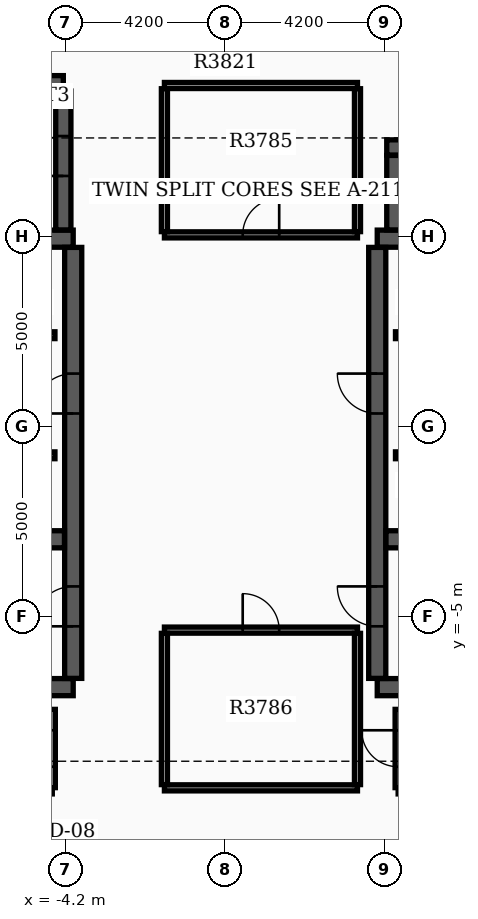
"""IFC4 building model, lengths in metres.
Left out: names, types, materials, properties, quantities, classifications, styles, units other than length and angle.
Written with IfcOpenShell. Run it as: python <this file> out.ifc"""

import sys

from ifc_helpers import new_model, si_unit, direction, frame, frame_2d, origin, place, context, subcontext, project, spatial, rectangle, extrude, element, fill, save


model = new_model("IFC4")
c1 = context("Model", 3, precision=1e-05, world=origin(), true_north=direction((0.0, 1.0)))
c2 = subcontext(c1, "Body", "Model", "MODEL_VIEW")
j1 = project(units=[si_unit("LENGTHUNIT", "METRE"), si_unit("PLANEANGLEUNIT", "RADIAN")], contexts=[c1])
p1 = place(None, origin())
s1 = spatial("IfcSite", under=j1, at=p1, CompositionType="ELEMENT")
p2 = place(p1, origin())
s2 = spatial("IfcBuilding", under=s1, at=p2, CompositionType="ELEMENT")
p3 = place(p2, frame((0.0, 0.0, 236.4)))
s3 = spatial("IfcBuildingStorey", under=s2, at=p3, CompositionType="ELEMENT", Elevation=236.4)
for number, where, z_axis, x_axis in (
    (1, (-12.4, -6.85, 0.0), (0.0, 0.0, 1.0), (1.0, 0.0, 0.0)),
    (2, (-12.4, 4.95, 0.0), (0.0, 0.0, 1.0), (1.0, 0.0, 0.0)),
):
    element("IfcWall", number, at=place(p3, frame(where, z_axis=z_axis, x_axis=x_axis)), inside=s3, PredefinedType="SHEAR", context=c2, shape_type="SweptSolid", body=[
        extrude(rectangle(XDim=8.4, YDim=0.45, at=frame_2d((4.2, 0.0))), origin(), (0.0, 0.0, 1.0), 3.65),
    ])
p4 = place(p3, frame((-4.0, -6.62, 0.0), z_axis=(0.0, 0.0, 1.0), x_axis=(0.0, 1.0, 0.0)))
e3 = element("IfcWall", 3, at=p4, inside=s3, PredefinedType="SHEAR", context=c2, shape_type="SweptSolid", body=[
    extrude(rectangle(XDim=11.34, YDim=0.45, at=frame_2d((5.67, 0.0))), origin(), (0.0, 0.0, 1.0), 3.65),
])
p5 = place(p4, frame((1.37, 0.0, 0.0)))
e4 = element("IfcOpeningElement", 4, at=p5, cuts=e3, PredefinedType="OPENING", context=c2, shape_type="SweptSolid", body=[
    extrude(rectangle(XDim=1.05, YDim=2.15, at=frame_2d((0.525, 1.075))), frame((0.0, 0.235, 0.0), z_axis=(0.0, -1.0, 0.0), x_axis=(1.0, 0.0, 0.0)), (0.0, 0.0, 1.0), 0.47),
])
p6 = place(p4, frame((6.97, 0.0, 0.0)))
e5 = element("IfcOpeningElement", 5, at=p6, cuts=e3, PredefinedType="OPENING", context=c2, shape_type="SweptSolid", body=[
    extrude(rectangle(XDim=1.05, YDim=2.15, at=frame_2d((0.525, 1.075))), frame((0.0, 0.235, 0.0), z_axis=(0.0, -1.0, 0.0), x_axis=(1.0, 0.0, 0.0)), (0.0, 0.0, 1.0), 0.47),
])
p7 = place(p3, frame((-12.17, -2.96, 0.0), z_axis=(0.0, 0.0, 1.0), x_axis=(1.0, 0.0, 0.0)))
e6 = element("IfcWall", 6, at=p7, inside=s3, PredefinedType="SHEAR", context=c2, shape_type="SweptSolid", body=[
    extrude(rectangle(XDim=7.94, YDim=0.45, at=frame_2d((3.97, 0.0))), origin(), (0.0, 0.0, 1.0), 3.65),
])
for number, where, z_axis, x_axis in (
    (7, (4.0, -6.85, 0.0), (0.0, 0.0, 1.0), (1.0, 0.0, 0.0)),
    (8, (4.0, 4.95, 0.0), (0.0, 0.0, 1.0), (1.0, 0.0, 0.0)),
):
    element("IfcWall", number, at=place(p3, frame(where, z_axis=z_axis, x_axis=x_axis)), inside=s3, PredefinedType="SHEAR", context=c2, shape_type="SweptSolid", body=[
        extrude(rectangle(XDim=8.4, YDim=0.45, at=frame_2d((4.2, 0.0))), origin(), (0.0, 0.0, 1.0), 3.65),
    ])
p8 = place(p3, frame((4.0, -6.62, 0.0), z_axis=(0.0, 0.0, 1.0), x_axis=(0.0, 1.0, 0.0)))
e9 = element("IfcWall", 9, at=p8, inside=s3, PredefinedType="SHEAR", context=c2, shape_type="SweptSolid", body=[
    extrude(rectangle(XDim=11.34, YDim=0.45, at=frame_2d((5.67, 0.0))), origin(), (0.0, 0.0, 1.0), 3.65),
])
p9 = place(p8, frame((1.37, 0.0, 0.0)))
e10 = element("IfcOpeningElement", 10, at=p9, cuts=e9, PredefinedType="OPENING", context=c2, shape_type="SweptSolid", body=[
    extrude(rectangle(XDim=1.05, YDim=2.15, at=frame_2d((0.525, 1.075))), frame((0.0, 0.235, 0.0), z_axis=(0.0, -1.0, 0.0), x_axis=(1.0, 0.0, 0.0)), (0.0, 0.0, 1.0), 0.47),
])
p10 = place(p8, frame((6.97, 0.0, 0.0)))
e11 = element("IfcOpeningElement", 11, at=p10, cuts=e9, PredefinedType="OPENING", context=c2, shape_type="SweptSolid", body=[
    extrude(rectangle(XDim=1.05, YDim=2.15, at=frame_2d((0.525, 1.075))), frame((0.0, 0.235, 0.0), z_axis=(0.0, -1.0, 0.0), x_axis=(1.0, 0.0, 0.0)), (0.0, 0.0, 1.0), 0.47),
])
p11 = place(p3, frame((4.23, -2.96, 0.0), z_axis=(0.0, 0.0, 1.0), x_axis=(1.0, 0.0, 0.0)))
e12 = element("IfcWall", 12, at=p11, inside=s3, PredefinedType="SHEAR", context=c2, shape_type="SweptSolid", body=[
    extrude(rectangle(XDim=7.94, YDim=0.45, at=frame_2d((3.97, 0.0))), origin(), (0.0, 0.0, 1.0), 3.65),
])
p12 = place(p3, frame((-12.22, 9.04, 0.0), z_axis=(0.0, 0.0, 1.0), x_axis=(1.0, 0.0, 0.0)))
e13 = element("IfcWall", 13, at=p12, inside=s3, PredefinedType="SHEAR", context=c2, shape_type="SweptSolid", body=[
    extrude(rectangle(XDim=7.96, YDim=0.4, at=frame_2d((3.98, 0.0))), origin(), (0.0, 0.0, 1.0), 3.65),
])
p13 = place(p3, frame((-4.26, 5.18, 0.0), z_axis=(0.0, 0.0, 1.0), x_axis=(0.0, 1.0, 0.0)))
e14 = element("IfcWall", 14, at=p13, inside=s3, PredefinedType="SHEAR", context=c2, shape_type="SweptSolid", body=[
    extrude(rectangle(XDim=3.655, YDim=0.4, at=frame_2d((1.828, 0.0))), origin(), (0.0, 0.0, 1.0), 3.65),
])
p14 = place(p13, frame((1.42, 0.0, 0.0)))
e15 = element("IfcOpeningElement", 15, at=p14, cuts=e14, PredefinedType="OPENING", context=c2, shape_type="SweptSolid", body=[
    extrude(rectangle(XDim=1.05, YDim=2.15, at=frame_2d((0.525, 1.075))), frame((0.0, 0.21, 0.0), z_axis=(0.0, -1.0, 0.0), x_axis=(1.0, 0.0, 0.0)), (0.0, 0.0, 1.0), 0.42),
])
p15 = place(p3, frame((4.45, 5.18, 0.0), z_axis=(0.0, 0.0, 1.0), x_axis=(0.0, 1.0, 0.0)))
e16 = element("IfcWall", 16, at=p15, inside=s3, PredefinedType="SHEAR", context=c2, shape_type="SweptSolid", body=[
    extrude(rectangle(XDim=1.96, YDim=0.4, at=frame_2d((0.98, 0.0))), origin(), (0.0, 0.0, 1.0), 3.65),
])
p16 = place(p3, frame((4.25, 7.35, 0.0), z_axis=(0.0, 0.0, 1.0), x_axis=(1.0, 0.0, 0.0)))
e17 = element("IfcWall", 17, at=p16, inside=s3, PredefinedType="SHEAR", context=c2, shape_type="SweptSolid", body=[
    extrude(rectangle(XDim=5.4, YDim=0.4, at=frame_2d((2.7, 0.0))), origin(), (0.0, 0.0, 1.0), 3.65),
])
p17 = place(p3, frame((-11.9, 2.41, 0.0), z_axis=(0.0, 0.0, 1.0), x_axis=(1.0, 0.0, 0.0)))
e18 = element("IfcWall", 18, at=p17, inside=s3, PredefinedType="SOLIDWALL", context=c2, shape_type="SweptSolid", body=[
    extrude(rectangle(XDim=7.42, YDim=0.18, at=frame_2d((3.71, 0.0))), origin(), (0.0, 0.0, 1.0), 3.12),
])
p18 = place(p17, frame((0.55, 0.0, 0.0)))
e19 = element("IfcOpeningElement", 19, at=p18, cuts=e18, PredefinedType="OPENING", context=c2, shape_type="SweptSolid", body=[
    extrude(rectangle(XDim=1.1, YDim=2.15, at=frame_2d((0.55, 1.075))), frame((0.0, 0.1, 0.0), z_axis=(0.0, -1.0, 0.0), x_axis=(1.0, 0.0, 0.0)), (0.0, 0.0, 1.0), 0.2),
])
p19 = place(p17, frame((4.9, 0.0, 0.0)))
e20 = element("IfcOpeningElement", 20, at=p19, cuts=e18, PredefinedType="OPENING", context=c2, shape_type="SweptSolid", body=[
    extrude(rectangle(XDim=0.88, YDim=2.1, at=frame_2d((0.44, 1.05))), frame((0.0, 0.1, 0.0), z_axis=(0.0, -1.0, 0.0), x_axis=(1.0, 0.0, 0.0)), (0.0, 0.0, 1.0), 0.2),
])
p20 = place(p3, frame((4.48, 2.41, 0.0), z_axis=(0.0, 0.0, 1.0), x_axis=(1.0, 0.0, 0.0)))
e21 = element("IfcWall", 21, at=p20, inside=s3, PredefinedType="SOLIDWALL", context=c2, shape_type="SweptSolid", body=[
    extrude(rectangle(XDim=7.42, YDim=0.18, at=frame_2d((3.71, 0.0))), origin(), (0.0, 0.0, 1.0), 3.12),
])
p21 = place(p20, frame((5.67, 0.0, 0.0)))
e22 = element("IfcOpeningElement", 22, at=p21, cuts=e21, PredefinedType="OPENING", context=c2, shape_type="SweptSolid", body=[
    extrude(rectangle(XDim=1.1, YDim=2.15, at=frame_2d((0.55, 1.075))), frame((0.0, 0.1, 0.0), z_axis=(0.0, -1.0, 0.0), x_axis=(1.0, 0.0, 0.0)), (0.0, 0.0, 1.0), 0.2),
])
p22 = place(p20, frame((1.6, 0.0, 0.0)))
e23 = element("IfcOpeningElement", 23, at=p22, cuts=e21, PredefinedType="OPENING", context=c2, shape_type="SweptSolid", body=[
    extrude(rectangle(XDim=0.88, YDim=2.1, at=frame_2d((0.44, 1.05))), frame((0.0, 0.1, 0.0), z_axis=(0.0, -1.0, 0.0), x_axis=(1.0, 0.0, 0.0)), (0.0, 0.0, 1.0), 0.2),
])
p23 = place(p3, frame((-11.9, -0.75, 0.0), z_axis=(0.0, 0.0, 1.0), x_axis=(1.0, 0.0, 0.0)))
e24 = element("IfcWall", 24, at=p23, inside=s3, PredefinedType="SOLIDWALL", context=c2, shape_type="SweptSolid", body=[
    extrude(rectangle(XDim=7.42, YDim=0.18, at=frame_2d((3.71, 0.0))), origin(), (0.0, 0.0, 1.0), 3.12),
])
p24 = place(p23, frame((5.75, 0.0, 0.0)))
e25 = element("IfcOpeningElement", 25, at=p24, cuts=e24, PredefinedType="OPENING", context=c2, shape_type="SweptSolid", body=[
    extrude(rectangle(XDim=1.1, YDim=2.15, at=frame_2d((0.55, 1.075))), frame((0.0, 0.1, 0.0), z_axis=(0.0, -1.0, 0.0), x_axis=(1.0, 0.0, 0.0)), (0.0, 0.0, 1.0), 0.2),
])
p25 = place(p23, frame((1.6, 0.0, 0.0)))
e26 = element("IfcOpeningElement", 26, at=p25, cuts=e24, PredefinedType="OPENING", context=c2, shape_type="SweptSolid", body=[
    extrude(rectangle(XDim=0.88, YDim=2.1, at=frame_2d((0.44, 1.05))), frame((0.0, 0.1, 0.0), z_axis=(0.0, -1.0, 0.0), x_axis=(1.0, 0.0, 0.0)), (0.0, 0.0, 1.0), 0.2),
])
p26 = place(p3, frame((4.48, -0.75, 0.0), z_axis=(0.0, 0.0, 1.0), x_axis=(1.0, 0.0, 0.0)))
e27 = element("IfcWall", 27, at=p26, inside=s3, PredefinedType="SOLIDWALL", context=c2, shape_type="SweptSolid", body=[
    extrude(rectangle(XDim=7.42, YDim=0.18, at=frame_2d((3.71, 0.0))), origin(), (0.0, 0.0, 1.0), 3.12),
])
p27 = place(p26, frame((3.92, 0.0, 0.0)))
e28 = element("IfcOpeningElement", 28, at=p27, cuts=e27, PredefinedType="OPENING", context=c2, shape_type="SweptSolid", body=[
    extrude(rectangle(XDim=1.1, YDim=2.15, at=frame_2d((0.55, 1.075))), frame((0.0, 0.1, 0.0), z_axis=(0.0, -1.0, 0.0), x_axis=(1.0, 0.0, 0.0)), (0.0, 0.0, 1.0), 0.2),
])
p28 = place(p26, frame((5.82, 0.0, 0.0)))
e29 = element("IfcOpeningElement", 29, at=p28, cuts=e27, PredefinedType="OPENING", context=c2, shape_type="SweptSolid", body=[
    extrude(rectangle(XDim=1.1, YDim=2.15, at=frame_2d((0.55, 1.075))), frame((0.0, 0.1, 0.0), z_axis=(0.0, -1.0, 0.0), x_axis=(1.0, 0.0, 0.0)), (0.0, 0.0, 1.0), 0.2),
])
p29 = place(p26, frame((1.6, 0.0, 0.0)))
e30 = element("IfcOpeningElement", 30, at=p29, cuts=e27, PredefinedType="OPENING", context=c2, shape_type="SweptSolid", body=[
    extrude(rectangle(XDim=0.88, YDim=2.1, at=frame_2d((0.44, 1.05))), frame((0.0, 0.1, 0.0), z_axis=(0.0, -1.0, 0.0), x_axis=(1.0, 0.0, 0.0)), (0.0, 0.0, 1.0), 0.2),
])
p30 = place(p3, frame((-1.6, 5.05, 0.0), z_axis=(0.0, 0.0, 1.0), x_axis=(1.0, 0.0, 0.0)))
e31 = element("IfcWall", 31, at=p30, inside=s3, PredefinedType="PARTITIONING", context=c2, shape_type="SweptSolid", body=[
    extrude(rectangle(XDim=5.08, YDim=0.16, at=frame_2d((2.54, 0.0))), origin(), (0.0, 0.0, 1.0), 3.12),
])
p31 = place(p30, frame((2.06, 0.0, 0.0)))
e32 = element("IfcOpeningElement", 32, at=p31, cuts=e31, PredefinedType="OPENING", context=c2, shape_type="SweptSolid", body=[
    extrude(rectangle(XDim=0.96, YDim=2.15, at=frame_2d((0.48, 1.075))), frame((0.0, 0.09, 0.0), z_axis=(0.0, -1.0, 0.0), x_axis=(1.0, 0.0, 0.0)), (0.0, 0.0, 1.0), 0.18),
])
p32 = place(p3, frame((-1.6, 8.98, 0.0), z_axis=(0.0, 0.0, 1.0), x_axis=(1.0, 0.0, 0.0)))
e33 = element("IfcWall", 33, at=p32, inside=s3, PredefinedType="PARTITIONING", context=c2, shape_type="SweptSolid", body=[
    extrude(rectangle(XDim=5.08, YDim=0.16, at=frame_2d((2.54, 0.0))), origin(), (0.0, 0.0, 1.0), 3.12),
])
for number, where, z_axis, x_axis in (
    (34, (-1.6, 5.135, 0.0), (0.0, 0.0, 1.0), (0.0, 1.0, 0.0)),
    (35, (3.48, 5.135, 0.0), (0.0, 0.0, 1.0), (0.0, 1.0, 0.0)),
):
    element("IfcWall", number, at=place(p3, frame(where, z_axis=z_axis, x_axis=x_axis)), inside=s3, PredefinedType="PARTITIONING", context=c2, shape_type="SweptSolid", body=[
        extrude(rectangle(XDim=3.76, YDim=0.16, at=frame_2d((1.88, 0.0))), origin(), (0.0, 0.0, 1.0), 3.12),
    ])
p33 = place(p3, frame((-1.6, -9.5, 0.0), z_axis=(0.0, 0.0, 1.0), x_axis=(1.0, 0.0, 0.0)))
e36 = element("IfcWall", 36, at=p33, inside=s3, PredefinedType="PARTITIONING", context=c2, shape_type="SweptSolid", body=[
    extrude(rectangle(XDim=5.08, YDim=0.16, at=frame_2d((2.54, 0.0))), origin(), (0.0, 0.0, 1.0), 3.12),
])
p34 = place(p3, frame((-1.6, -5.35, 0.0), z_axis=(0.0, 0.0, 1.0), x_axis=(1.0, 0.0, 0.0)))
e37 = element("IfcWall", 37, at=p34, inside=s3, PredefinedType="PARTITIONING", context=c2, shape_type="SweptSolid", body=[
    extrude(rectangle(XDim=5.08, YDim=0.16, at=frame_2d((2.54, 0.0))), origin(), (0.0, 0.0, 1.0), 3.12),
])
p35 = place(p34, frame((2.06, 0.0, 0.0)))
e38 = element("IfcOpeningElement", 38, at=p35, cuts=e37, PredefinedType="OPENING", context=c2, shape_type="SweptSolid", body=[
    extrude(rectangle(XDim=0.96, YDim=2.15, at=frame_2d((0.48, 1.075))), frame((0.0, 0.09, 0.0), z_axis=(0.0, -1.0, 0.0), x_axis=(1.0, 0.0, 0.0)), (0.0, 0.0, 1.0), 0.18),
])
for number, where, z_axis, x_axis in (
    (39, (-1.6, -9.415, 0.0), (0.0, 0.0, 1.0), (0.0, 1.0, 0.0)),
    (40, (3.48, -9.415, 0.0), (0.0, 0.0, 1.0), (0.0, 1.0, 0.0)),
):
    element("IfcWall", number, at=place(p3, frame(where, z_axis=z_axis, x_axis=x_axis)), inside=s3, PredefinedType="PARTITIONING", context=c2, shape_type="SweptSolid", body=[
        extrude(rectangle(XDim=3.98, YDim=0.16, at=frame_2d((1.99, 0.0))), origin(), (0.0, 0.0, 1.0), 3.12),
    ])
p36 = place(p3, frame((4.55, -9.58, 0.0), z_axis=(0.0, 0.0, 1.0), x_axis=(1.0, 0.0, 0.0)))
e41 = element("IfcWall", 41, at=p36, inside=s3, PredefinedType="PARTITIONING", context=c2, shape_type="SweptSolid", body=[
    extrude(rectangle(XDim=8.1, YDim=0.16, at=frame_2d((4.05, 0.0))), origin(), (0.0, 0.0, 1.0), 3.12),
])
p37 = place(p3, frame((4.55, -9.495, 0.0), z_axis=(0.0, 0.0, 1.0), x_axis=(0.0, 1.0, 0.0)))
e42 = element("IfcWall", 42, at=p37, inside=s3, PredefinedType="PARTITIONING", context=c2, shape_type="SweptSolid", body=[
    extrude(rectangle(XDim=2.06, YDim=0.16, at=frame_2d((1.03, 0.0))), origin(), (0.0, 0.0, 1.0), 3.12),
])
p38 = place(p37, frame((0.55, 0.0, 0.0)))
e43 = element("IfcOpeningElement", 43, at=p38, cuts=e42, PredefinedType="OPENING", context=c2, shape_type="SweptSolid", body=[
    extrude(rectangle(XDim=0.96, YDim=2.15, at=frame_2d((0.48, 1.075))), frame((0.0, 0.09, 0.0), z_axis=(0.0, -1.0, 0.0), x_axis=(1.0, 0.0, 0.0)), (0.0, 0.0, 1.0), 0.18),
])
p39 = place(p3, frame((-4.55, -9.495, 0.0), z_axis=(0.0, 0.0, 1.0), x_axis=(0.0, 1.0, 0.0)))
e44 = element("IfcWall", 44, at=p39, inside=s3, PredefinedType="PARTITIONING", context=c2, shape_type="SweptSolid", body=[
    extrude(rectangle(XDim=2.06, YDim=0.16, at=frame_2d((1.03, 0.0))), origin(), (0.0, 0.0, 1.0), 3.12),
])
p40 = place(p39, frame((0.55, 0.0, 0.0)))
e45 = element("IfcOpeningElement", 45, at=p40, cuts=e44, PredefinedType="OPENING", context=c2, shape_type="SweptSolid", body=[
    extrude(rectangle(XDim=0.96, YDim=2.15, at=frame_2d((0.48, 1.075))), frame((0.0, 0.09, 0.0), z_axis=(0.0, -1.0, 0.0), x_axis=(1.0, 0.0, 0.0)), (0.0, 0.0, 1.0), 0.18),
])
p41 = place(p5, origin())
e46 = element("IfcDoor", 46, at=p41, inside=s3, OperationType="SINGLE_SWING_LEFT", PredefinedType="DOOR", context=c2, shape_type="SweptSolid", body=[
    extrude(rectangle(XDim=1.05, YDim=2.15, at=frame_2d((0.525, 1.075))), frame((0.0, 0.025, 0.0), z_axis=(0.0, -1.0, 0.0), x_axis=(1.0, 0.0, 0.0)), (0.0, 0.0, 1.0), 0.05),
])
fill(e4, e46)
p42 = place(p9, origin())
e47 = element("IfcDoor", 47, at=p42, inside=s3, OperationType="SINGLE_SWING_RIGHT", PredefinedType="DOOR", context=c2, shape_type="SweptSolid", body=[
    extrude(rectangle(XDim=1.05, YDim=2.15, at=frame_2d((0.525, 1.075))), frame((0.0, 0.025, 0.0), z_axis=(0.0, -1.0, 0.0), x_axis=(1.0, 0.0, 0.0)), (0.0, 0.0, 1.0), 0.05),
])
fill(e10, e47)
p43 = place(p6, origin())
e48 = element("IfcDoor", 48, at=p43, inside=s3, OperationType="SINGLE_SWING_LEFT", PredefinedType="DOOR", context=c2, shape_type="SweptSolid", body=[
    extrude(rectangle(XDim=1.05, YDim=2.15, at=frame_2d((0.525, 1.075))), frame((0.0, 0.025, 0.0), z_axis=(0.0, -1.0, 0.0), x_axis=(1.0, 0.0, 0.0)), (0.0, 0.0, 1.0), 0.05),
])
fill(e5, e48)
p44 = place(p10, origin())
e49 = element("IfcDoor", 49, at=p44, inside=s3, OperationType="SINGLE_SWING_RIGHT", PredefinedType="DOOR", context=c2, shape_type="SweptSolid", body=[
    extrude(rectangle(XDim=1.05, YDim=2.15, at=frame_2d((0.525, 1.075))), frame((0.0, 0.025, 0.0), z_axis=(0.0, -1.0, 0.0), x_axis=(1.0, 0.0, 0.0)), (0.0, 0.0, 1.0), 0.05),
])
fill(e11, e49)
p45 = place(p14, origin())
e50 = element("IfcDoor", 50, at=p45, inside=s3, OperationType="SINGLE_SWING_LEFT", PredefinedType="DOOR", context=c2, shape_type="SweptSolid", body=[
    extrude(rectangle(XDim=1.05, YDim=2.15, at=frame_2d((0.525, 1.075))), frame((0.0, 0.025, 0.0), z_axis=(0.0, -1.0, 0.0), x_axis=(1.0, 0.0, 0.0)), (0.0, 0.0, 1.0), 0.05),
])
fill(e15, e50)
p46 = place(p31, origin())
e51 = element("IfcDoor", 51, at=p46, inside=s3, OperationType="SINGLE_SWING_RIGHT", PredefinedType="DOOR", context=c2, shape_type="SweptSolid", body=[
    extrude(rectangle(XDim=0.96, YDim=2.15, at=frame_2d((0.48, 1.075))), frame((0.0, 0.025, 0.0), z_axis=(0.0, -1.0, 0.0), x_axis=(1.0, 0.0, 0.0)), (0.0, 0.0, 1.0), 0.05),
])
fill(e32, e51)
p47 = place(p35, origin())
e52 = element("IfcDoor", 52, at=p47, inside=s3, OperationType="SINGLE_SWING_LEFT", PredefinedType="DOOR", context=c2, shape_type="SweptSolid", body=[
    extrude(rectangle(XDim=0.96, YDim=2.15, at=frame_2d((0.48, 1.075))), frame((0.0, 0.025, 0.0), z_axis=(0.0, -1.0, 0.0), x_axis=(1.0, 0.0, 0.0)), (0.0, 0.0, 1.0), 0.05),
])
fill(e38, e52)
p48 = place(p38, origin())
e53 = element("IfcDoor", 53, at=p48, inside=s3, OperationType="SINGLE_SWING_RIGHT", PredefinedType="DOOR", context=c2, shape_type="SweptSolid", body=[
    extrude(rectangle(XDim=0.96, YDim=2.15, at=frame_2d((0.48, 1.075))), frame((0.0, 0.025, 0.0), z_axis=(0.0, -1.0, 0.0), x_axis=(1.0, 0.0, 0.0)), (0.0, 0.0, 1.0), 0.05),
])
fill(e43, e53)
p49 = place(p40, origin())
e54 = element("IfcDoor", 54, at=p49, inside=s3, OperationType="SINGLE_SWING_LEFT", PredefinedType="DOOR", context=c2, shape_type="SweptSolid", body=[
    extrude(rectangle(XDim=0.96, YDim=2.15, at=frame_2d((0.48, 1.075))), frame((0.0, 0.025, 0.0), z_axis=(0.0, -1.0, 0.0), x_axis=(1.0, 0.0, 0.0)), (0.0, 0.0, 1.0), 0.05),
])
fill(e45, e54)
save(model, sys.argv[1])
